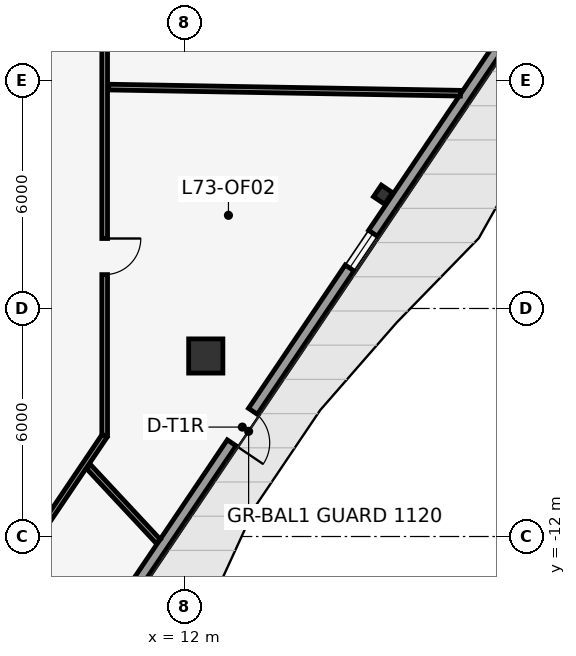
"""IFC4 building model, lengths in metres.
Left out: names, types, materials, properties, quantities, classifications, styles, units other than length and angle.
Written with IfcOpenShell. Run it as: python <this file> out.ifc"""

import sys

from ifc_helpers import new_model, si_unit, direction, frame, frame_2d, origin, origin_2d, place, context, subcontext, project, spatial, rectangle, i_section, extrude, element, fill, save


model = new_model("IFC4")
c1 = context("Model", 3, precision=1e-05, world=origin(), true_north=direction((0.0, 1.0)))
c2 = subcontext(c1, "Body", "Model", "MODEL_VIEW")
j1 = project(units=[si_unit("LENGTHUNIT", "METRE"), si_unit("PLANEANGLEUNIT", "RADIAN")], contexts=[c1])
p1 = place(None, origin())
s1 = spatial("IfcSite", under=j1, at=p1, CompositionType="ELEMENT")
p2 = place(p1, origin())
s2 = spatial("IfcBuilding", under=s1, at=p2, CompositionType="ELEMENT")
p3 = place(p2, frame((0.0, 0.0, 310.6)))
s3 = spatial("IfcBuildingStorey", under=s2, at=p3, CompositionType="ELEMENT", Elevation=310.6)
p4 = place(p3, frame((12.56, -7.25, 0.0), z_axis=(0.0, 0.0, 1.0), x_axis=(1.0, 0.0, 0.0)))
e1 = element("IfcColumn", 1, at=p4, inside=s3, PredefinedType="COLUMN", context=c2, shape_type="SweptSolid", body=[
    extrude(rectangle(XDim=0.9, YDim=0.9, at=origin_2d()), origin(), (0.0, 0.0, 1.0), 4.1),
])
p5 = place(p3, frame((17.224, -3.006, 0.0), z_axis=(0.0, 0.0, 1.0), x_axis=(0.559192903471, 0.829037572555, 0.0)))
e2 = element("IfcColumn", 2, at=p5, inside=s3, PredefinedType="COLUMN", context=c2, shape_type="SweptSolid", body=[
    extrude(i_section(OverallWidth=0.368, OverallDepth=0.356, WebThickness=0.011, FlangeThickness=0.018, at=origin_2d()), origin(), (0.0, 0.0, 1.0), 4.1),
])
p6 = place(p3, frame((25.8, 9.083, 0.0), z_axis=(0.0, 0.0, 1.0), x_axis=(-0.55919392155, -0.829036885851, 0.0)))
e3 = element("IfcWall", 3, at=p6, inside=s3, PredefinedType="STANDARD", context=c2, shape_type="SweptSolid", body=[
    extrude(rectangle(XDim=43.915, YDim=0.28, at=frame_2d((21.958, 0.0))), origin(), (0.0, 0.0, 1.0), 3.85),
])
p7 = place(p6, frame((21.457, 0.0, 0.0)))
e4 = element("IfcOpeningElement", 4, at=p7, cuts=e3, PredefinedType="OPENING", context=c2, shape_type="SweptSolid", body=[
    extrude(rectangle(XDim=1.0, YDim=2.15, at=frame_2d((0.5, 1.075))), frame((0.0, 0.15, 0.0), z_axis=(0.0, -1.0, 0.0), x_axis=(1.0, 0.0, 0.0)), (0.0, 0.0, 1.0), 0.3),
])
p8 = place(p6, frame((4.607, 0.0, 0.85)))
e5 = element("IfcOpeningElement", 5, at=p8, cuts=e3, PredefinedType="OPENING", context=c2, shape_type="SweptSolid", body=[
    extrude(rectangle(XDim=1.1, YDim=2.15, at=frame_2d((0.55, 1.075))), frame((0.0, 0.15, 0.0), z_axis=(0.0, -1.0, 0.0), x_axis=(1.0, 0.0, 0.0)), (0.0, 0.0, 1.0), 0.3),
])
p9 = place(p6, frame((15.807, 0.0, 0.85)))
e6 = element("IfcOpeningElement", 6, at=p9, cuts=e3, PredefinedType="OPENING", context=c2, shape_type="SweptSolid", body=[
    extrude(rectangle(XDim=1.1, YDim=2.15, at=frame_2d((0.55, 1.075))), frame((0.0, 0.15, 0.0), z_axis=(0.0, -1.0, 0.0), x_axis=(1.0, 0.0, 0.0)), (0.0, 0.0, 1.0), 0.3),
])
p10 = place(p6, frame((27.007, 0.0, 0.85)))
e7 = element("IfcOpeningElement", 7, at=p10, cuts=e3, PredefinedType="OPENING", context=c2, shape_type="SweptSolid", body=[
    extrude(rectangle(XDim=1.1, YDim=2.15, at=frame_2d((0.55, 1.075))), frame((0.0, 0.15, 0.0), z_axis=(0.0, -1.0, 0.0), x_axis=(1.0, 0.0, 0.0)), (0.0, 0.0, 1.0), 0.3),
])
p11 = place(p6, frame((32.607, 0.0, 0.85)))
e8 = element("IfcOpeningElement", 8, at=p11, cuts=e3, PredefinedType="OPENING", context=c2, shape_type="SweptSolid", body=[
    extrude(rectangle(XDim=1.1, YDim=2.15, at=frame_2d((0.55, 1.075))), frame((0.0, 0.15, 0.0), z_axis=(0.0, -1.0, 0.0), x_axis=(1.0, 0.0, 0.0)), (0.0, 0.0, 1.0), 0.3),
])
p12 = place(p6, frame((38.207, 0.0, 0.85)))
e9 = element("IfcOpeningElement", 9, at=p12, cuts=e3, PredefinedType="OPENING", context=c2, shape_type="SweptSolid", body=[
    extrude(rectangle(XDim=1.1, YDim=2.15, at=frame_2d((0.55, 1.075))), frame((0.0, 0.15, 0.0), z_axis=(0.0, -1.0, 0.0), x_axis=(1.0, 0.0, 0.0)), (0.0, 0.0, 1.0), 0.3),
])
p13 = place(p3, frame((9.9, 11.85, 0.0), z_axis=(0.0, 0.0, 1.0), x_axis=(0.0, -1.0, 0.0)))
e10 = element("IfcWall", 10, at=p13, inside=s3, PredefinedType="PARTITIONING", context=c2, shape_type="SweptSolid", body=[
    extrude(rectangle(XDim=21.198, YDim=0.15, at=frame_2d((10.599, 0.0))), origin(), (0.0, 0.0, 1.0), 3.85),
])
p14 = place(p13, frame((16.009, 0.0, 0.0)))
e11 = element("IfcOpeningElement", 11, at=p14, cuts=e10, PredefinedType="OPENING", context=c2, shape_type="SweptSolid", body=[
    extrude(rectangle(XDim=0.95, YDim=2.15, at=frame_2d((0.475, 1.075))), frame((0.0, 0.085, 0.0), z_axis=(0.0, -1.0, 0.0), x_axis=(1.0, 0.0, 0.0)), (0.0, 0.0, 1.0), 0.17),
])
p15 = place(p13, frame((5.664, 0.0, 0.0)))
e12 = element("IfcOpeningElement", 12, at=p15, cuts=e10, PredefinedType="OPENING", context=c2, shape_type="SweptSolid", body=[
    extrude(rectangle(XDim=0.95, YDim=2.15, at=frame_2d((0.475, 1.075))), frame((0.0, 0.085, 0.0), z_axis=(0.0, -1.0, 0.0), x_axis=(1.0, 0.0, 0.0)), (0.0, 0.0, 1.0), 0.17),
])
p16 = place(p3, frame((9.9, -9.348, 0.0), z_axis=(0.0, 0.0, 1.0), x_axis=(-0.559200828408, -0.829032227062, 0.0)))
e13 = element("IfcWall", 13, at=p16, inside=s3, PredefinedType="PARTITIONING", context=c2, shape_type="SweptSolid", body=[
    extrude(rectangle(XDim=2.836, YDim=0.15, at=frame_2d((1.418, 0.0))), origin(), (0.0, 0.0, 1.0), 3.85),
])
p17 = place(p3, frame((9.477, -10.163, 0.0), z_axis=(0.0, 0.0, 1.0), x_axis=(0.682023235441, -0.731330504163, 0.0)))
e14 = element("IfcWall", 14, at=p17, inside=s3, PredefinedType="PARTITIONING", context=c2, shape_type="SweptSolid", body=[
    extrude(rectangle(XDim=2.684, YDim=0.15, at=frame_2d((1.342, 0.0))), origin(), (0.0, 0.0, 1.0), 3.85),
])
p18 = place(p3, frame((10.005, -0.175, 0.0), z_axis=(0.0, 0.0, 1.0), x_axis=(0.999847550881, -0.017460670009, 0.0)))
e15 = element("IfcWall", 15, at=p18, inside=s3, PredefinedType="PARTITIONING", context=c2, shape_type="SweptSolid", body=[
    extrude(rectangle(XDim=9.256, YDim=0.15, at=frame_2d((4.628, 0.0))), origin(), (0.0, 0.0, 1.0), 3.85),
])
p19 = place(p7, origin())
e16 = element("IfcDoor", 16, at=p19, inside=s3, OperationType="SINGLE_SWING_RIGHT", PredefinedType="DOOR", context=c2, shape_type="SweptSolid", body=[
    extrude(rectangle(XDim=1.0, YDim=2.15, at=frame_2d((0.5, 1.075))), frame((0.0, 0.025, 0.0), z_axis=(0.0, -1.0, 0.0), x_axis=(1.0, 0.0, 0.0)), (0.0, 0.0, 1.0), 0.05),
])
fill(e4, e16)
p20 = place(p9, origin())
e17 = element("IfcWindow", 17, at=p20, inside=s3, PartitioningType="SINGLE_PANEL", PredefinedType="WINDOW", context=c2, shape_type="SweptSolid", body=[
    extrude(rectangle(XDim=1.1, YDim=2.15, at=frame_2d((0.55, 1.075))), frame((0.0, 0.03, 0.0), z_axis=(0.0, -1.0, 0.0), x_axis=(1.0, 0.0, 0.0)), (0.0, 0.0, 1.0), 0.06),
])
fill(e6, e17)
p21 = place(p14, origin())
e18 = element("IfcDoor", 18, at=p21, inside=s3, OperationType="SINGLE_SWING_LEFT", PredefinedType="DOOR", context=c2, shape_type="SweptSolid", body=[
    extrude(rectangle(XDim=0.95, YDim=2.15, at=frame_2d((0.475, 1.075))), frame((0.0, 0.025, 0.0), z_axis=(0.0, -1.0, 0.0), x_axis=(1.0, 0.0, 0.0)), (0.0, 0.0, 1.0), 0.05),
])
fill(e11, e18)
save(model, sys.argv[1])
